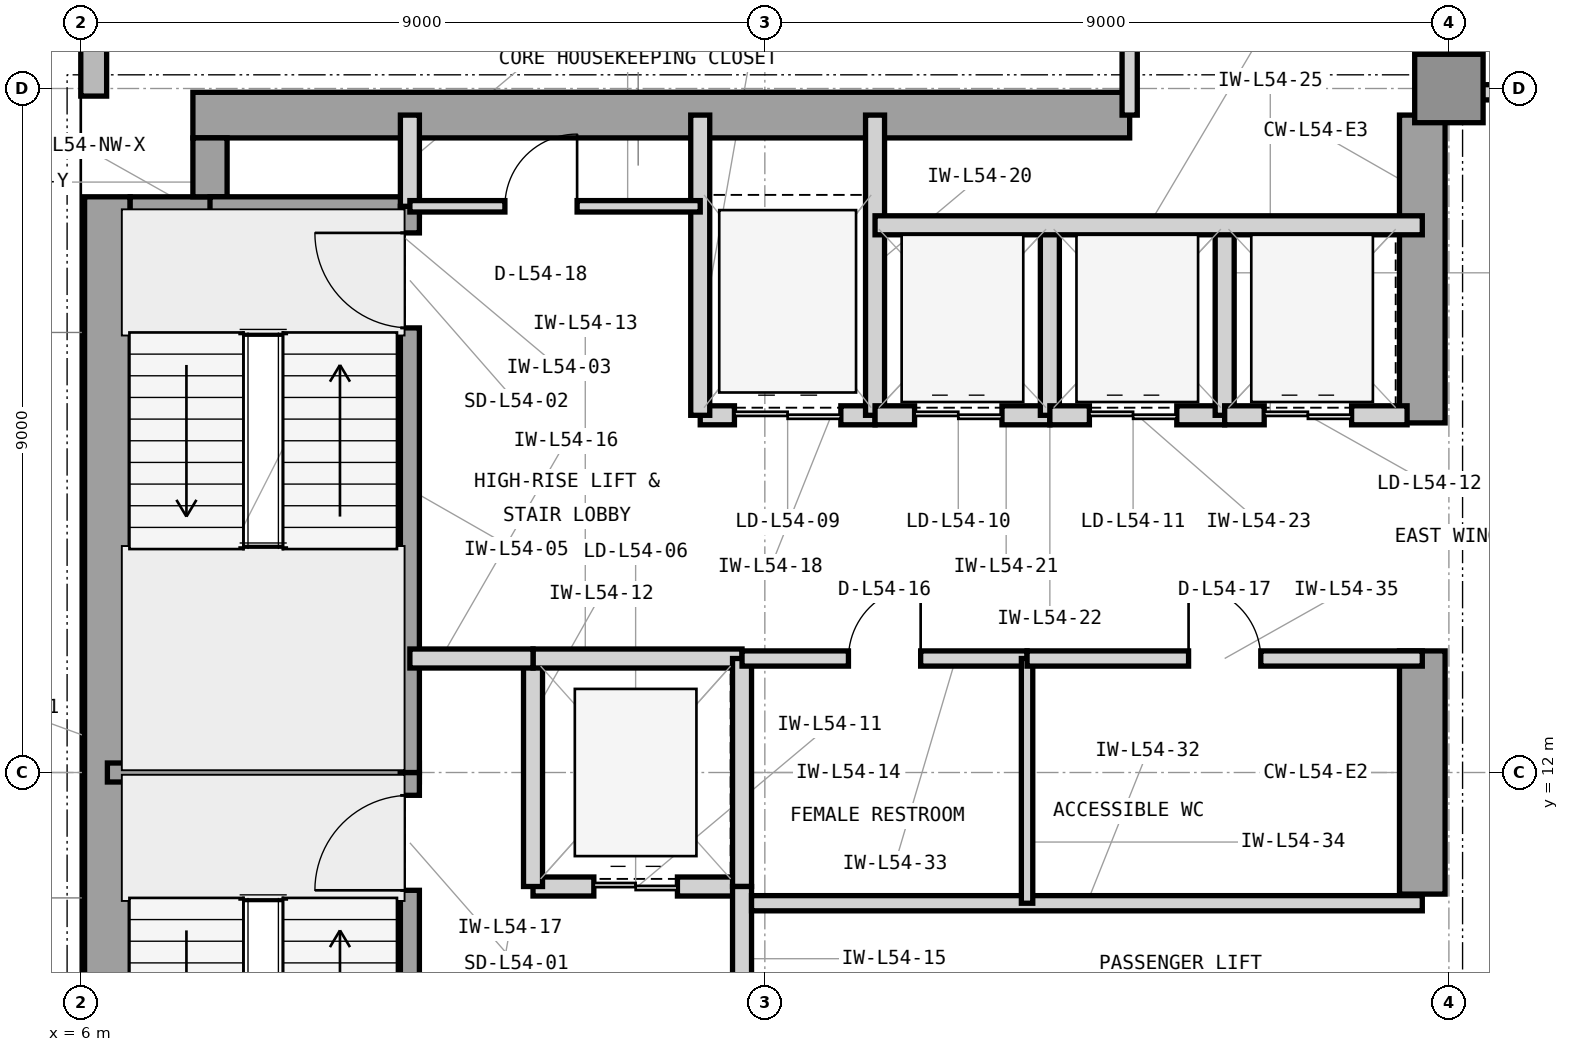
"""IFC4 building model, lengths in metres.
Left out: names, types, materials, properties, quantities, classifications, styles, units other than length and angle.
Written with IfcOpenShell. Run it as: python <this file> out.ifc"""

import sys

from ifc_helpers import new_model, si_unit, direction, frame, frame_2d, origin, origin_2d, place, context, subcontext, project, spatial, rectangle, extrude, element, fill, save


model = new_model("IFC4")
c1 = context("Model", 3, precision=1e-05, world=origin(), true_north=direction((0.0, 1.0)))
c2 = subcontext(c1, "Body", "Model", "MODEL_VIEW")
j1 = project(units=[si_unit("LENGTHUNIT", "METRE"), si_unit("PLANEANGLEUNIT", "RADIAN")], contexts=[c1])
p1 = place(None, origin())
s1 = spatial("IfcSite", under=j1, at=p1, CompositionType="ELEMENT")
p2 = place(p1, origin())
s2 = spatial("IfcBuilding", under=s1, at=p2, CompositionType="ELEMENT")
p3 = place(p2, frame((0.0, 0.0, 222.9)))
s3 = spatial("IfcBuildingStorey", under=s2, at=p3, CompositionType="ELEMENT", Elevation=222.9)
p4 = place(p3, frame((6.35, 4.425, 0.0), z_axis=(0.0, 0.0, 1.0), x_axis=(0.0, 1.0, 0.0)))
e1 = element("IfcWall", 1, at=p4, inside=s3, PredefinedType="SHEAR", context=c2, shape_type="SweptSolid", body=[
    extrude(rectangle(XDim=15.15, YDim=0.6, at=frame_2d((7.575, 0.0))), origin(), (0.0, 0.0, 1.0), 3.9),
])
p5 = place(p3, frame((7.475, 20.65, 0.0), z_axis=(0.0, 0.0, 1.0), x_axis=(1.0, 0.0, 0.0)))
e2 = element("IfcWall", 2, at=p5, inside=s3, PredefinedType="SHEAR", context=c2, shape_type="SweptSolid", body=[
    extrude(rectangle(XDim=12.325, YDim=0.6, at=frame_2d((6.163, 0.0))), origin(), (0.0, 0.0, 1.0), 3.9),
])
p6 = place(p3, frame((23.65, 10.4, 0.0), z_axis=(0.0, 0.0, 1.0), x_axis=(0.0, 1.0, 0.0)))
e3 = element("IfcWall", 3, at=p6, inside=s3, PredefinedType="SHEAR", context=c2, shape_type="SweptSolid", body=[
    extrude(rectangle(XDim=3.2, YDim=0.6, at=frame_2d((1.6, 0.0))), origin(), (0.0, 0.0, 1.0), 3.9),
])
p7 = place(p3, frame((23.65, 16.6, 0.0), z_axis=(0.0, 0.0, 1.0), x_axis=(0.0, 1.0, 0.0)))
e4 = element("IfcWall", 4, at=p7, inside=s3, PredefinedType="SHEAR", context=c2, shape_type="SweptSolid", body=[
    extrude(rectangle(XDim=4.05, YDim=0.6, at=frame_2d((2.025, 0.0))), origin(), (0.0, 0.0, 1.0), 3.9),
])
p8 = place(p3, frame((6.65, 19.35, 0.0), z_axis=(0.0, 0.0, 1.0), x_axis=(1.0, 0.0, 0.0)))
e5 = element("IfcWall", 5, at=p8, inside=s3, PredefinedType="SHEAR", context=c2, shape_type="SweptSolid", body=[
    extrude(rectangle(XDim=1.275, YDim=0.45, at=frame_2d((0.638, 0.0))), origin(), (0.0, 0.0, 1.0), 3.9),
])
p9 = place(p3, frame((7.7, 19.575, 0.0), z_axis=(0.0, 0.0, 1.0), x_axis=(0.0, 1.0, 0.0)))
e6 = element("IfcWall", 6, at=p9, inside=s3, PredefinedType="SHEAR", context=c2, shape_type="SweptSolid", body=[
    extrude(rectangle(XDim=0.775, YDim=0.45, at=frame_2d((0.388, 0.0))), origin(), (0.0, 0.0, 1.0), 3.9),
])
p10 = place(p3, frame((24.0, 21.0, 0.0), z_axis=(0.0, 0.0, 1.0), x_axis=(1.0, 0.0, 0.0)))
e7 = element("IfcColumn", 7, at=p10, inside=s3, PredefinedType="COLUMN", context=c2, shape_type="SweptSolid", body=[
    extrude(rectangle(XDim=0.9, YDim=0.9, at=origin_2d()), origin(), (0.0, 0.0, 1.0), 3.9),
])
p11 = place(p3, frame((6.17, 40.4, 0.0), z_axis=(0.0, 0.0, 1.0), x_axis=(0.0, -1.0, 0.0)))
e8 = element("IfcWall", 8, at=p11, inside=s3, PredefinedType="STANDARD", context=c2, shape_type="SweptSolid", body=[
    extrude(rectangle(XDim=19.5, YDim=0.34, at=frame_2d((9.75, 0.0))), origin(), (0.0, 0.0, 1.0), 3.62),
])
p12 = place(p11, frame((6.163, 0.0, 0.9)))
e9 = element("IfcOpeningElement", 9, at=p12, cuts=e8, PredefinedType="OPENING", context=c2, shape_type="SweptSolid", body=[
    extrude(rectangle(XDim=2.3, YDim=2.2, at=frame_2d((1.15, 1.1))), frame((0.0, 0.18, 0.0), z_axis=(0.0, -1.0, 0.0), x_axis=(1.0, 0.0, 0.0)), (0.0, 0.0, 1.0), 0.36),
])
p13 = place(p3, frame((6.35, 12.0, 0.0), z_axis=(0.0, 0.0, 1.0), x_axis=(1.0, 0.0, 0.0)))
e10 = element("IfcWall", 10, at=p13, inside=s3, PredefinedType="SHEAR", context=c2, shape_type="SweptSolid", body=[
    extrude(rectangle(XDim=4.105, YDim=0.25, at=frame_2d((2.052, 0.0))), origin(), (0.0, 0.0, 1.0), 3.9),
])
p14 = place(p3, frame((7.7, 19.45, 0.0), z_axis=(0.0, 0.0, 1.0), x_axis=(1.0, 0.0, 0.0)))
e11 = element("IfcWall", 11, at=p14, inside=s3, PredefinedType="SHEAR", context=c2, shape_type="SweptSolid", body=[
    extrude(rectangle(XDim=2.755, YDim=0.25, at=frame_2d((1.377, 0.0))), origin(), (0.0, 0.0, 1.0), 3.9),
])
p15 = place(p3, frame((10.33, 4.55, 0.0), z_axis=(0.0, 0.0, 1.0), x_axis=(0.0, 1.0, 0.0)))
e12 = element("IfcWall", 12, at=p15, inside=s3, PredefinedType="SHEAR", context=c2, shape_type="SweptSolid", body=[
    extrude(rectangle(XDim=7.45, YDim=0.25, at=frame_2d((3.725, 0.0))), origin(), (0.0, 0.0, 1.0), 3.9),
])
p16 = place(p15, frame((5.9, 0.0, 0.0)))
e13 = element("IfcOpeningElement", 13, at=p16, cuts=e12, PredefinedType="OPENING", context=c2, shape_type="SweptSolid", body=[
    extrude(rectangle(XDim=1.25, YDim=2.2, at=frame_2d((0.625, 1.1))), frame((0.0, 0.135, 0.0), z_axis=(0.0, -1.0, 0.0), x_axis=(1.0, 0.0, 0.0)), (0.0, 0.0, 1.0), 0.27),
])
p17 = place(p3, frame((10.33, 12.0, 0.0), z_axis=(0.0, 0.0, 1.0), x_axis=(0.0, 1.0, 0.0)))
e14 = element("IfcWall", 14, at=p17, inside=s3, PredefinedType="SHEAR", context=c2, shape_type="SweptSolid", body=[
    extrude(rectangle(XDim=7.45, YDim=0.25, at=frame_2d((3.725, 0.0))), origin(), (0.0, 0.0, 1.0), 3.9),
])
p18 = place(p17, frame((5.85, 0.0, 0.0)))
e15 = element("IfcOpeningElement", 15, at=p18, cuts=e14, PredefinedType="OPENING", context=c2, shape_type="SweptSolid", body=[
    extrude(rectangle(XDim=1.25, YDim=2.2, at=frame_2d((0.625, 1.1))), frame((0.0, 0.135, 0.0), z_axis=(0.0, -1.0, 0.0), x_axis=(1.0, 0.0, 0.0)), (0.0, 0.0, 1.0), 0.27),
])
p19 = place(p3, frame((10.33, 19.45, 0.0), z_axis=(0.0, 0.0, 1.0), x_axis=(0.0, 1.0, 0.0)))
e16 = element("IfcWall", 16, at=p19, inside=s3, PredefinedType="PARTITIONING", context=c2, shape_type="SweptSolid", body=[
    extrude(rectangle(XDim=1.2, YDim=0.25, at=frame_2d((0.6, 0.0))), origin(), (0.0, 0.0, 1.0), 2.837),
])
p20 = place(p3, frame((11.95, 10.5, 0.0), z_axis=(0.0, 0.0, 1.0), x_axis=(1.0, 0.0, 0.0)))
e17 = element("IfcWall", 17, at=p20, inside=s3, PredefinedType="PARTITIONING", context=c2, shape_type="SweptSolid", body=[
    extrude(rectangle(XDim=2.75, YDim=0.25, at=frame_2d((1.375, 0.0))), origin(), (0.0, 0.0, 1.0), 3.073),
])
p21 = place(p20, frame((0.8, 0.0, 0.0)))
e18 = element("IfcOpeningElement", 18, at=p21, cuts=e17, PredefinedType="OPENING", context=c2, shape_type="SweptSolid", body=[
    extrude(rectangle(XDim=1.1, YDim=2.25, at=frame_2d((0.55, 1.125))), frame((0.0, 0.135, 0.0), z_axis=(0.0, -1.0, 0.0), x_axis=(1.0, 0.0, 0.0)), (0.0, 0.0, 1.0), 0.27),
])
p22 = place(p3, frame((11.95, 10.5, 0.0), z_axis=(0.0, 0.0, 1.0), x_axis=(0.0, 1.0, 0.0)))
e19 = element("IfcWall", 19, at=p22, inside=s3, PredefinedType="PARTITIONING", context=c2, shape_type="SweptSolid", body=[
    extrude(rectangle(XDim=3.0, YDim=0.25, at=frame_2d((1.5, 0.0))), origin(), (0.0, 0.0, 1.0), 3.61),
])
p23 = place(p3, frame((11.95, 13.5, 0.0), z_axis=(0.0, 0.0, 1.0), x_axis=(1.0, 0.0, 0.0)))
e20 = element("IfcWall", 20, at=p23, inside=s3, PredefinedType="PARTITIONING", context=c2, shape_type="SweptSolid", body=[
    extrude(rectangle(XDim=2.75, YDim=0.25, at=frame_2d((1.375, 0.0))), origin(), (0.0, 0.0, 1.0), 3.073),
])
p24 = place(p3, frame((14.7, 10.5, 0.0), z_axis=(0.0, 0.0, 1.0), x_axis=(0.0, 1.0, 0.0)))
e21 = element("IfcWall", 21, at=p24, inside=s3, PredefinedType="PARTITIONING", context=c2, shape_type="SweptSolid", body=[
    extrude(rectangle(XDim=3.0, YDim=0.25, at=frame_2d((1.5, 0.0))), origin(), (0.0, 0.0, 1.0), 3.61),
])
p25 = place(p3, frame((14.7, 6.7, 0.0), z_axis=(0.0, 0.0, 1.0), x_axis=(0.0, 1.0, 0.0)))
e22 = element("IfcWall", 22, at=p25, inside=s3, PredefinedType="PARTITIONING", context=c2, shape_type="SweptSolid", body=[
    extrude(rectangle(XDim=3.8, YDim=0.25, at=frame_2d((1.9, 0.0))), origin(), (0.0, 0.0, 1.0), 3.61),
])
p26 = place(p25, frame((1.3, 0.0, 0.0)))
e23 = element("IfcOpeningElement", 23, at=p26, cuts=e22, PredefinedType="OPENING", context=c2, shape_type="SweptSolid", body=[
    extrude(rectangle(XDim=1.2, YDim=2.2, at=frame_2d((0.6, 1.1))), frame((0.0, 0.135, 0.0), z_axis=(0.0, -1.0, 0.0), x_axis=(1.0, 0.0, 0.0)), (0.0, 0.0, 1.0), 0.27),
])
p27 = place(p3, frame((10.33, 13.5, 0.0), z_axis=(0.0, 0.0, 1.0), x_axis=(1.0, 0.0, 0.0)))
e24 = element("IfcWall", 24, at=p27, inside=s3, PredefinedType="PARTITIONING", context=c2, shape_type="SweptSolid", body=[
    extrude(rectangle(XDim=1.62, YDim=0.25, at=frame_2d((0.81, 0.0))), origin(), (0.0, 0.0, 1.0), 3.073),
])
p28 = place(p3, frame((14.15, 16.7, 0.0), z_axis=(0.0, 0.0, 1.0), x_axis=(1.0, 0.0, 0.0)))
e25 = element("IfcWall", 25, at=p28, inside=s3, PredefinedType="PARTITIONING", context=c2, shape_type="SweptSolid", body=[
    extrude(rectangle(XDim=2.3, YDim=0.25, at=frame_2d((1.15, 0.0))), origin(), (0.0, 0.0, 1.0), 3.073),
])
p29 = place(p28, frame((0.45, 0.0, 0.0)))
e26 = element("IfcOpeningElement", 26, at=p29, cuts=e25, PredefinedType="OPENING", context=c2, shape_type="SweptSolid", body=[
    extrude(rectangle(XDim=1.4, YDim=2.35, at=frame_2d((0.7, 1.175))), frame((0.0, 0.135, 0.0), z_axis=(0.0, -1.0, 0.0), x_axis=(1.0, 0.0, 0.0)), (0.0, 0.0, 1.0), 0.27),
])
for number, where, z_axis, x_axis in (
    (27, (14.15, 16.7, 0.0), (0.0, 0.0, 1.0), (0.0, 1.0, 0.0)),
    (28, (16.45, 16.7, 0.0), (0.0, 0.0, 1.0), (0.0, 1.0, 0.0)),
):
    element("IfcWall", number, at=place(p3, frame(where, z_axis=z_axis, x_axis=x_axis)), inside=s3, PredefinedType="PARTITIONING", context=c2, shape_type="SweptSolid", body=[
        extrude(rectangle(XDim=3.95, YDim=0.25, at=frame_2d((1.975, 0.0))), origin(), (0.0, 0.0, 1.0), 3.61),
    ])
p30 = place(p3, frame((16.45, 16.7, 0.0), z_axis=(0.0, 0.0, 1.0), x_axis=(1.0, 0.0, 0.0)))
e29 = element("IfcWall", 29, at=p30, inside=s3, PredefinedType="PARTITIONING", context=c2, shape_type="SweptSolid", body=[
    extrude(rectangle(XDim=2.3, YDim=0.25, at=frame_2d((1.15, 0.0))), origin(), (0.0, 0.0, 1.0), 3.073),
])
p31 = place(p30, frame((0.52, 0.0, 0.0)))
e30 = element("IfcOpeningElement", 30, at=p31, cuts=e29, PredefinedType="OPENING", context=c2, shape_type="SweptSolid", body=[
    extrude(rectangle(XDim=1.15, YDim=2.25, at=frame_2d((0.575, 1.125))), frame((0.0, 0.135, 0.0), z_axis=(0.0, -1.0, 0.0), x_axis=(1.0, 0.0, 0.0)), (0.0, 0.0, 1.0), 0.27),
])
p32 = place(p3, frame((18.75, 16.7, 0.0), z_axis=(0.0, 0.0, 1.0), x_axis=(0.0, 1.0, 0.0)))
e31 = element("IfcWall", 31, at=p32, inside=s3, PredefinedType="PARTITIONING", context=c2, shape_type="SweptSolid", body=[
    extrude(rectangle(XDim=2.5, YDim=0.25, at=frame_2d((1.25, 0.0))), origin(), (0.0, 0.0, 1.0), 3.61),
])
p33 = place(p3, frame((18.75, 16.7, 0.0), z_axis=(0.0, 0.0, 1.0), x_axis=(1.0, 0.0, 0.0)))
e32 = element("IfcWall", 32, at=p33, inside=s3, PredefinedType="PARTITIONING", context=c2, shape_type="SweptSolid", body=[
    extrude(rectangle(XDim=2.3, YDim=0.25, at=frame_2d((1.15, 0.0))), origin(), (0.0, 0.0, 1.0), 3.073),
])
p34 = place(p33, frame((0.52, 0.0, 0.0)))
e33 = element("IfcOpeningElement", 33, at=p34, cuts=e32, PredefinedType="OPENING", context=c2, shape_type="SweptSolid", body=[
    extrude(rectangle(XDim=1.15, YDim=2.25, at=frame_2d((0.575, 1.125))), frame((0.0, 0.135, 0.0), z_axis=(0.0, -1.0, 0.0), x_axis=(1.0, 0.0, 0.0)), (0.0, 0.0, 1.0), 0.27),
])
p35 = place(p3, frame((21.05, 16.7, 0.0), z_axis=(0.0, 0.0, 1.0), x_axis=(0.0, 1.0, 0.0)))
e34 = element("IfcWall", 34, at=p35, inside=s3, PredefinedType="PARTITIONING", context=c2, shape_type="SweptSolid", body=[
    extrude(rectangle(XDim=2.5, YDim=0.25, at=frame_2d((1.25, 0.0))), origin(), (0.0, 0.0, 1.0), 3.61),
])
p36 = place(p3, frame((21.05, 16.7, 0.0), z_axis=(0.0, 0.0, 1.0), x_axis=(1.0, 0.0, 0.0)))
e35 = element("IfcWall", 35, at=p36, inside=s3, PredefinedType="PARTITIONING", context=c2, shape_type="SweptSolid", body=[
    extrude(rectangle(XDim=2.4, YDim=0.25, at=frame_2d((1.2, 0.0))), origin(), (0.0, 0.0, 1.0), 3.073),
])
p37 = place(p36, frame((0.52, 0.0, 0.0)))
e36 = element("IfcOpeningElement", 36, at=p37, cuts=e35, PredefinedType="OPENING", context=c2, shape_type="SweptSolid", body=[
    extrude(rectangle(XDim=1.15, YDim=2.25, at=frame_2d((0.575, 1.125))), frame((0.0, 0.135, 0.0), z_axis=(0.0, -1.0, 0.0), x_axis=(1.0, 0.0, 0.0)), (0.0, 0.0, 1.0), 0.27),
])
p38 = place(p3, frame((16.45, 19.2, 0.0), z_axis=(0.0, 0.0, 1.0), x_axis=(1.0, 0.0, 0.0)))
e37 = element("IfcWall", 37, at=p38, inside=s3, PredefinedType="PARTITIONING", context=c2, shape_type="SweptSolid", body=[
    extrude(rectangle(XDim=7.2, YDim=0.25, at=frame_2d((3.6, 0.0))), origin(), (0.0, 0.0, 1.0), 3.61),
])
p39 = place(p3, frame((14.825, 10.28, 0.0), z_axis=(0.0, 0.0, 1.0), x_axis=(1.0, 0.0, 0.0)))
e38 = element("IfcWall", 38, at=p39, inside=s3, PredefinedType="PARTITIONING", context=c2, shape_type="SweptSolid", body=[
    extrude(rectangle(XDim=8.825, YDim=0.2, at=frame_2d((4.413, 0.0))), origin(), (0.0, 0.0, 1.0), 3.61),
])
p40 = place(p3, frame((14.7, 13.5, 0.0), z_axis=(0.0, 0.0, 1.0), x_axis=(1.0, 0.0, 0.0)))
e39 = element("IfcWall", 39, at=p40, inside=s3, PredefinedType="PARTITIONING", context=c2, shape_type="SweptSolid", body=[
    extrude(rectangle(XDim=3.75, YDim=0.2, at=frame_2d((1.875, 0.0))), origin(), (0.0, 0.0, 1.0), 3.073),
])
p41 = place(p40, frame((1.4, 0.0, 0.0)))
e40 = element("IfcOpeningElement", 40, at=p41, cuts=e39, PredefinedType="OPENING", context=c2, shape_type="SweptSolid", body=[
    extrude(rectangle(XDim=0.95, YDim=2.1, at=frame_2d((0.475, 1.05))), frame((0.0, 0.11, 0.0), z_axis=(0.0, -1.0, 0.0), x_axis=(1.0, 0.0, 0.0)), (0.0, 0.0, 1.0), 0.22),
])
p42 = place(p3, frame((18.45, 10.28, 0.0), z_axis=(0.0, 0.0, 1.0), x_axis=(0.0, 1.0, 0.0)))
e41 = element("IfcWall", 41, at=p42, inside=s3, PredefinedType="PARTITIONING", context=c2, shape_type="SweptSolid", body=[
    extrude(rectangle(XDim=3.22, YDim=0.15, at=frame_2d((1.61, 0.0))), origin(), (0.0, 0.0, 1.0), 3.61),
])
p43 = place(p3, frame((18.45, 13.5, 0.0), z_axis=(0.0, 0.0, 1.0), x_axis=(1.0, 0.0, 0.0)))
e42 = element("IfcWall", 42, at=p43, inside=s3, PredefinedType="PARTITIONING", context=c2, shape_type="SweptSolid", body=[
    extrude(rectangle(XDim=5.2, YDim=0.2, at=frame_2d((2.6, 0.0))), origin(), (0.0, 0.0, 1.0), 3.073),
])
p44 = place(p43, frame((2.125, 0.0, 0.0)))
e43 = element("IfcOpeningElement", 43, at=p44, cuts=e42, PredefinedType="OPENING", context=c2, shape_type="SweptSolid", body=[
    extrude(rectangle(XDim=0.95, YDim=2.1, at=frame_2d((0.475, 1.05))), frame((0.0, 0.11, 0.0), z_axis=(0.0, -1.0, 0.0), x_axis=(1.0, 0.0, 0.0)), (0.0, 0.0, 1.0), 0.22),
])
p45 = place(p3, frame((10.33, 19.45, 0.0), z_axis=(0.0, 0.0, 1.0), x_axis=(1.0, 0.0, 0.0)))
e44 = element("IfcWall", 44, at=p45, inside=s3, PredefinedType="PARTITIONING", context=c2, shape_type="SweptSolid", body=[
    extrude(rectangle(XDim=3.82, YDim=0.15, at=frame_2d((1.91, 0.0))), origin(), (0.0, 0.0, 1.0), 3.61),
])
p46 = place(p45, frame((1.25, 0.0, 0.0)))
e45 = element("IfcOpeningElement", 45, at=p46, cuts=e44, PredefinedType="OPENING", context=c2, shape_type="SweptSolid", body=[
    extrude(rectangle(XDim=0.95, YDim=2.1, at=frame_2d((0.475, 1.05))), frame((0.0, 0.085, 0.0), z_axis=(0.0, -1.0, 0.0), x_axis=(1.0, 0.0, 0.0)), (0.0, 0.0, 1.0), 0.17),
])
p47 = place(p3, frame((24.05, 20.95, 0.0), z_axis=(0.0, 0.0, 1.0), x_axis=(1.0, 0.0, 0.0)))
e46 = element("IfcWall", 46, at=p47, inside=s3, PredefinedType="PARTITIONING", context=c2, shape_type="SweptSolid", body=[
    extrude(rectangle(XDim=8.5, YDim=0.2, at=frame_2d((4.25, 0.0))), origin(), (0.0, 0.0, 1.0), 2.993),
])
p48 = place(p47, frame((0.6, 0.0, 0.0)))
e47 = element("IfcOpeningElement", 47, at=p48, cuts=e46, PredefinedType="OPENING", context=c2, shape_type="SweptSolid", body=[
    extrude(rectangle(XDim=1.5, YDim=2.3, at=frame_2d((0.75, 1.15))), frame((0.0, 0.11, 0.0), z_axis=(0.0, -1.0, 0.0), x_axis=(1.0, 0.0, 0.0)), (0.0, 0.0, 1.0), 0.22),
])
p49 = place(p3, frame((19.8, 20.65, 0.0), z_axis=(0.0, 0.0, 1.0), x_axis=(0.0, 1.0, 0.0)))
e48 = element("IfcWall", 48, at=p49, inside=s3, PredefinedType="PARTITIONING", context=c2, shape_type="SweptSolid", body=[
    extrude(rectangle(XDim=6.15, YDim=0.2, at=frame_2d((3.075, 0.0))), origin(), (0.0, 0.0, 1.0), 3.61),
])
p50 = place(p16, origin())
e49 = element("IfcDoor", 49, at=p50, inside=s3, OperationType="SINGLE_SWING_LEFT", PredefinedType="DOOR", context=c2, shape_type="SweptSolid", body=[
    extrude(rectangle(XDim=1.25, YDim=2.2, at=frame_2d((0.625, 1.1))), frame((0.0, 0.025, 0.0), z_axis=(0.0, -1.0, 0.0), x_axis=(1.0, 0.0, 0.0)), (0.0, 0.0, 1.0), 0.05),
])
fill(e13, e49)
p51 = place(p18, origin())
e50 = element("IfcDoor", 50, at=p51, inside=s3, OperationType="SINGLE_SWING_RIGHT", PredefinedType="DOOR", context=c2, shape_type="SweptSolid", body=[
    extrude(rectangle(XDim=1.25, YDim=2.2, at=frame_2d((0.625, 1.1))), frame((0.0, 0.025, 0.0), z_axis=(0.0, -1.0, 0.0), x_axis=(1.0, 0.0, 0.0)), (0.0, 0.0, 1.0), 0.05),
])
fill(e15, e50)
p52 = place(p21, origin())
e51 = element("IfcDoor", 51, at=p52, inside=s3, OperationType="DOUBLE_DOOR_SLIDING", PredefinedType="DOOR", context=c2, shape_type="SweptSolid", body=[
    extrude(rectangle(XDim=1.1, YDim=2.25, at=frame_2d((0.55, 1.125))), frame((0.0, 0.025, 0.0), z_axis=(0.0, -1.0, 0.0), x_axis=(1.0, 0.0, 0.0)), (0.0, 0.0, 1.0), 0.05),
])
fill(e18, e51)
p53 = place(p29, origin())
e52 = element("IfcDoor", 52, at=p53, inside=s3, OperationType="DOUBLE_DOOR_SLIDING", PredefinedType="DOOR", context=c2, shape_type="SweptSolid", body=[
    extrude(rectangle(XDim=1.4, YDim=2.35, at=frame_2d((0.7, 1.175))), frame((0.0, 0.025, 0.0), z_axis=(0.0, -1.0, 0.0), x_axis=(1.0, 0.0, 0.0)), (0.0, 0.0, 1.0), 0.05),
])
fill(e26, e52)
p54 = place(p31, origin())
e53 = element("IfcDoor", 53, at=p54, inside=s3, OperationType="DOUBLE_DOOR_SLIDING", PredefinedType="DOOR", context=c2, shape_type="SweptSolid", body=[
    extrude(rectangle(XDim=1.15, YDim=2.25, at=frame_2d((0.575, 1.125))), frame((0.0, 0.025, 0.0), z_axis=(0.0, -1.0, 0.0), x_axis=(1.0, 0.0, 0.0)), (0.0, 0.0, 1.0), 0.05),
])
fill(e30, e53)
p55 = place(p34, origin())
e54 = element("IfcDoor", 54, at=p55, inside=s3, OperationType="DOUBLE_DOOR_SLIDING", PredefinedType="DOOR", context=c2, shape_type="SweptSolid", body=[
    extrude(rectangle(XDim=1.15, YDim=2.25, at=frame_2d((0.575, 1.125))), frame((0.0, 0.025, 0.0), z_axis=(0.0, -1.0, 0.0), x_axis=(1.0, 0.0, 0.0)), (0.0, 0.0, 1.0), 0.05),
])
fill(e33, e54)
p56 = place(p37, origin())
e55 = element("IfcDoor", 55, at=p56, inside=s3, OperationType="DOUBLE_DOOR_SLIDING", PredefinedType="DOOR", context=c2, shape_type="SweptSolid", body=[
    extrude(rectangle(XDim=1.15, YDim=2.25, at=frame_2d((0.575, 1.125))), frame((0.0, 0.025, 0.0), z_axis=(0.0, -1.0, 0.0), x_axis=(1.0, 0.0, 0.0)), (0.0, 0.0, 1.0), 0.05),
])
fill(e36, e55)
p57 = place(p41, origin())
e56 = element("IfcDoor", 56, at=p57, inside=s3, OperationType="SINGLE_SWING_RIGHT", PredefinedType="DOOR", context=c2, shape_type="SweptSolid", body=[
    extrude(rectangle(XDim=0.95, YDim=2.1, at=frame_2d((0.475, 1.05))), frame((0.0, 0.025, 0.0), z_axis=(0.0, -1.0, 0.0), x_axis=(1.0, 0.0, 0.0)), (0.0, 0.0, 1.0), 0.05),
])
fill(e40, e56)
p58 = place(p44, origin())
e57 = element("IfcDoor", 57, at=p58, inside=s3, OperationType="SINGLE_SWING_LEFT", PredefinedType="DOOR", context=c2, shape_type="SweptSolid", body=[
    extrude(rectangle(XDim=0.95, YDim=2.1, at=frame_2d((0.475, 1.05))), frame((0.0, 0.025, 0.0), z_axis=(0.0, -1.0, 0.0), x_axis=(1.0, 0.0, 0.0)), (0.0, 0.0, 1.0), 0.05),
])
fill(e43, e57)
p59 = place(p46, origin())
e58 = element("IfcDoor", 58, at=p59, inside=s3, OperationType="SINGLE_SWING_RIGHT", PredefinedType="DOOR", context=c2, shape_type="SweptSolid", body=[
    extrude(rectangle(XDim=0.95, YDim=2.1, at=frame_2d((0.475, 1.05))), frame((0.0, 0.025, 0.0), z_axis=(0.0, -1.0, 0.0), x_axis=(1.0, 0.0, 0.0)), (0.0, 0.0, 1.0), 0.05),
])
fill(e45, e58)
save(model, sys.argv[1])
